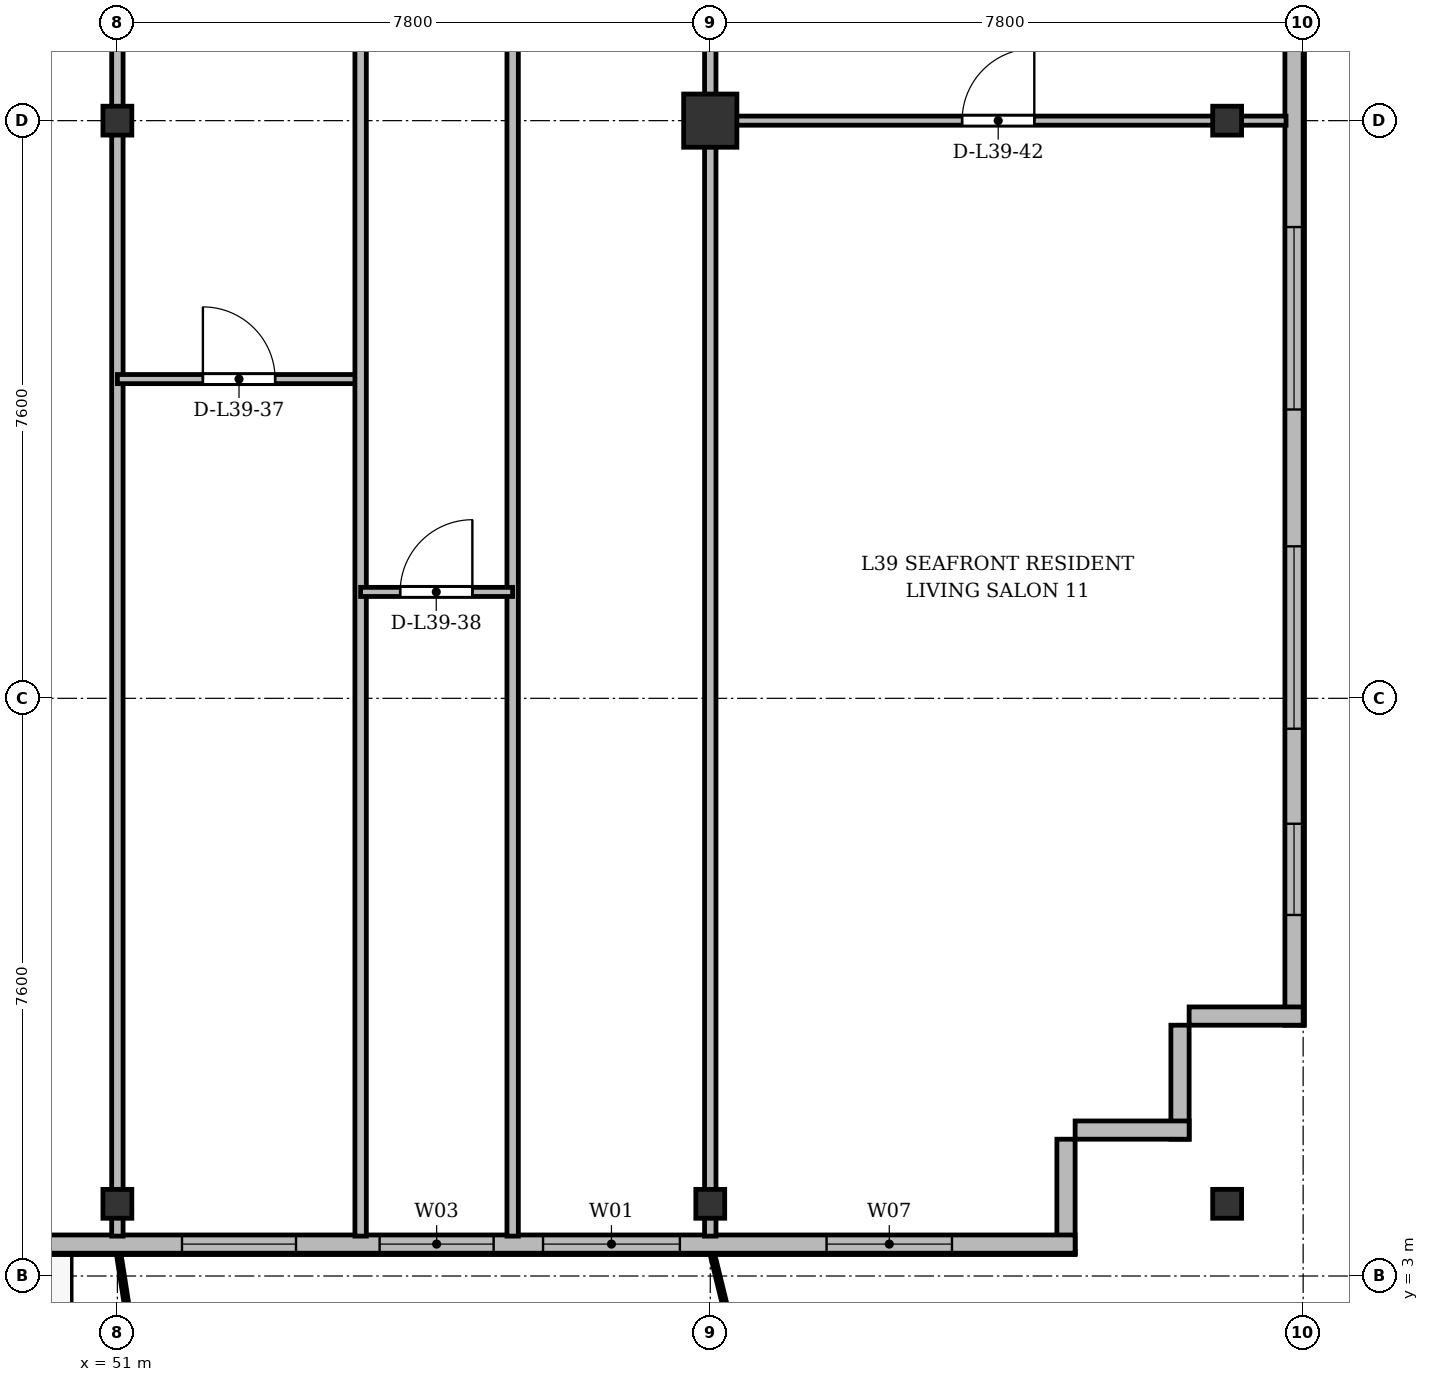
"""IFC4 building model, lengths in metres.
Left out: names, types, materials, properties, quantities, classifications, styles, units other than length and angle.
Written with IfcOpenShell. Run it as: python <this file> out.ifc"""

import sys

from ifc_helpers import new_model, si_unit, direction, frame, frame_2d, origin, origin_2d, place, context, subcontext, project, spatial, rectangle, i_section, extrude, source, transform, mapped, element, fill, save


model = new_model("IFC4")
c1 = context("Model", 3, precision=1e-05, world=origin(), true_north=direction((0.0, 1.0)))
c2 = subcontext(c1, "Body", "Model", "MODEL_VIEW")
j1 = project(units=[si_unit("LENGTHUNIT", "METRE"), si_unit("PLANEANGLEUNIT", "RADIAN")], contexts=[c1])
p1 = place(None, origin())
s1 = spatial("IfcSite", under=j1, at=p1, CompositionType="ELEMENT")
p2 = place(p1, origin())
s2 = spatial("IfcBuilding", under=s1, at=p2, CompositionType="ELEMENT")
p3 = place(p2, frame((0.0, 0.0, 150.1)))
s3 = spatial("IfcBuildingStorey", under=s2, at=p3, CompositionType="ELEMENT", Elevation=150.1)
m1 = source(origin(), c2, "Body", "SweptSolid", [
    extrude(i_section(OverallWidth=0.38, OverallDepth=0.38, WebThickness=0.02, FlangeThickness=0.03, at=origin_2d()), origin(), (0.0, 0.0, 1.0), 3.6),
])
for number, where, z_axis, x_axis in (
    (1, (51.0, 3.95, 0.0), (0.0, 0.0, 1.0), (1.0, 0.0, 0.0)),
    (2, (51.0, 18.2, 0.0), (0.0, 0.0, 1.0), (1.0, 0.0, 0.0)),
    (3, (58.8, 3.95, 0.0), (0.0, 0.0, 1.0), (1.0, 0.0, 0.0)),
):
    element("IfcColumn", number, at=place(p3, frame(where, z_axis=z_axis, x_axis=x_axis)), inside=s3, PredefinedType="COLUMN", context=c2, shape_type="MappedRepresentation", body=[
        mapped(m1, transform((0.0, 0.0, 0.0), x_axis=(1.0, 0.0, 0.0), y_axis=(0.0, 1.0, 0.0), z_axis=(0.0, 0.0, 1.0), scale=1.0)),
    ])
m2 = source(origin(), c2, "Body", "SweptSolid", [
    extrude(rectangle(XDim=0.7, YDim=0.7, at=origin_2d()), origin(), (0.0, 0.0, 1.0), 3.6),
])
p4 = place(p3, frame((58.8, 18.2, 0.0), z_axis=(0.0, 0.0, 1.0), x_axis=(1.0, 0.0, 0.0)))
e4 = element("IfcColumn", 4, at=p4, inside=s3, PredefinedType="COLUMN", context=c2, shape_type="MappedRepresentation", body=[
    mapped(m2, transform((0.0, 0.0, 0.0), x_axis=(1.0, 0.0, 0.0), y_axis=(0.0, 1.0, 0.0), z_axis=(0.0, 0.0, 1.0), scale=1.0)),
])
for number, where, z_axis, x_axis in (
    (5, (65.6, 3.95, 0.0), (0.0, 0.0, 1.0), (1.0, 0.0, 0.0)),
    (6, (65.6, 18.2, 0.0), (0.0, 0.0, 1.0), (1.0, 0.0, 0.0)),
):
    element("IfcColumn", number, at=place(p3, frame(where, z_axis=z_axis, x_axis=x_axis)), inside=s3, PredefinedType="COLUMN", context=c2, shape_type="MappedRepresentation", body=[
        mapped(m1, transform((0.0, 0.0, 0.0), x_axis=(1.0, 0.0, 0.0), y_axis=(0.0, 1.0, 0.0), z_axis=(0.0, 0.0, 1.0), scale=1.0)),
    ])
p5 = place(p3, frame((66.48, 45.5, 0.0), z_axis=(0.0, 0.0, 1.0), x_axis=(0.0, -1.0, 0.0)))
e7 = element("IfcWall", 7, at=p5, inside=s3, PredefinedType="SOLIDWALL", context=c2, shape_type="SweptSolid", body=[
    extrude(rectangle(XDim=39.2, YDim=0.24, at=frame_2d((19.6, 0.0))), origin(), (0.0, 0.0, 1.0), 3.35),
])
p6 = place(p5, frame((36.55, 0.0, 0.92)))
e8 = element("IfcOpeningElement", 8, at=p6, cuts=e7, PredefinedType="OPENING", context=c2, shape_type="SweptSolid", body=[
    extrude(rectangle(XDim=1.2, YDim=1.65, at=frame_2d((0.6, 0.825))), frame((0.0, 0.13, 0.0), z_axis=(0.0, -1.0, 0.0), x_axis=(1.0, 0.0, 0.0)), (0.0, 0.0, 1.0), 0.26),
])
p7 = place(p5, frame((32.9, 0.0, 0.92)))
e9 = element("IfcOpeningElement", 9, at=p7, cuts=e7, PredefinedType="OPENING", context=c2, shape_type="SweptSolid", body=[
    extrude(rectangle(XDim=2.4, YDim=2.1, at=frame_2d((1.2, 1.05))), frame((0.0, 0.13, 0.0), z_axis=(0.0, -1.0, 0.0), x_axis=(1.0, 0.0, 0.0)), (0.0, 0.0, 1.0), 0.26),
])
p8 = place(p5, frame((28.7, 0.0, 0.92)))
e10 = element("IfcOpeningElement", 10, at=p8, cuts=e7, PredefinedType="OPENING", context=c2, shape_type="SweptSolid", body=[
    extrude(rectangle(XDim=2.4, YDim=2.1, at=frame_2d((1.2, 1.05))), frame((0.0, 0.13, 0.0), z_axis=(0.0, -1.0, 0.0), x_axis=(1.0, 0.0, 0.0)), (0.0, 0.0, 1.0), 0.26),
])
p9 = place(p5, frame((21.5, 0.0, 0.92)))
e11 = element("IfcOpeningElement", 11, at=p9, cuts=e7, PredefinedType="OPENING", context=c2, shape_type="SweptSolid", body=[
    extrude(rectangle(XDim=2.4, YDim=2.1, at=frame_2d((1.2, 1.05))), frame((0.0, 0.13, 0.0), z_axis=(0.0, -1.0, 0.0), x_axis=(1.0, 0.0, 0.0)), (0.0, 0.0, 1.0), 0.26),
])
p10 = place(p5, frame((7.5, 0.0, 0.92)))
e12 = element("IfcOpeningElement", 12, at=p10, cuts=e7, PredefinedType="OPENING", context=c2, shape_type="SweptSolid", body=[
    extrude(rectangle(XDim=2.4, YDim=2.1, at=frame_2d((1.2, 1.05))), frame((0.0, 0.13, 0.0), z_axis=(0.0, -1.0, 0.0), x_axis=(1.0, 0.0, 0.0)), (0.0, 0.0, 1.0), 0.26),
])
p11 = place(p5, frame((4.5, 0.0, 0.92)))
e13 = element("IfcOpeningElement", 13, at=p11, cuts=e7, PredefinedType="OPENING", context=c2, shape_type="SweptSolid", body=[
    extrude(rectangle(XDim=1.2, YDim=1.65, at=frame_2d((0.6, 0.825))), frame((0.0, 0.13, 0.0), z_axis=(0.0, -1.0, 0.0), x_axis=(1.0, 0.0, 0.0)), (0.0, 0.0, 1.0), 0.26),
])
p12 = place(p5, frame((1.15, 0.0, 0.92)))
e14 = element("IfcOpeningElement", 14, at=p12, cuts=e7, PredefinedType="OPENING", context=c2, shape_type="SweptSolid", body=[
    extrude(rectangle(XDim=1.2, YDim=1.65, at=frame_2d((0.6, 0.825))), frame((0.0, 0.13, 0.0), z_axis=(0.0, -1.0, 0.0), x_axis=(1.0, 0.0, 0.0)), (0.0, 0.0, 1.0), 0.26),
])
p13 = place(p3, frame((66.6, 6.42, 0.0), z_axis=(0.0, 0.0, 1.0), x_axis=(-1.0, 0.0, 0.0)))
e15 = element("IfcWall", 15, at=p13, inside=s3, PredefinedType="SOLIDWALL", context=c2, shape_type="SweptSolid", body=[
    extrude(rectangle(XDim=1.5, YDim=0.24, at=frame_2d((0.75, 0.0))), origin(), (0.0, 0.0, 1.0), 2.85),
])
for number, where, z_axis, x_axis in (
    (16, (64.98, 6.3, 0.0), (0.0, 0.0, 1.0), (0.0, -1.0, 0.0)),
    (17, (65.1, 4.92, 0.0), (0.0, 0.0, 1.0), (-1.0, 0.0, 0.0)),
):
    element("IfcWall", number, at=place(p3, frame(where, z_axis=z_axis, x_axis=x_axis)), inside=s3, PredefinedType="SOLIDWALL", context=c2, shape_type="SweptSolid", body=[
        extrude(rectangle(XDim=1.5, YDim=0.24, at=frame_2d((0.75, 0.0))), origin(), (0.0, 0.0, 1.0), 3.35),
    ])
p14 = place(p3, frame((63.48, 4.8, 0.0), z_axis=(0.0, 0.0, 1.0), x_axis=(0.0, -1.0, 0.0)))
e18 = element("IfcWall", 18, at=p14, inside=s3, PredefinedType="SOLIDWALL", context=c2, shape_type="SweptSolid", body=[
    extrude(rectangle(XDim=1.5, YDim=0.24, at=frame_2d((0.75, 0.0))), origin(), (0.0, 0.0, 1.0), 2.75),
])
p15 = place(p3, frame((63.6, 3.42, 0.0), z_axis=(0.0, 0.0, 1.0), x_axis=(-1.0, 0.0, 0.0)))
e19 = element("IfcWall", 19, at=p15, inside=s3, PredefinedType="SOLIDWALL", context=c2, shape_type="SweptSolid", body=[
    extrude(rectangle(XDim=52.8, YDim=0.24, at=frame_2d((26.4, 0.0))), origin(), (0.0, 0.0, 1.0), 3.35),
])
p16 = place(p15, frame((1.62, 0.0, 0.9)))
e20 = element("IfcOpeningElement", 20, at=p16, cuts=e19, PredefinedType="OPENING", context=c2, shape_type="SweptSolid", body=[
    extrude(rectangle(XDim=1.65, YDim=1.85, at=frame_2d((0.825, 0.925))), frame((0.0, 0.13, 0.0), z_axis=(0.0, -1.0, 0.0), x_axis=(1.0, 0.0, 0.0)), (0.0, 0.0, 1.0), 0.26),
])
p17 = place(p15, frame((5.2, 0.0, 0.9)))
e21 = element("IfcOpeningElement", 21, at=p17, cuts=e19, PredefinedType="OPENING", context=c2, shape_type="SweptSolid", body=[
    extrude(rectangle(XDim=1.8, YDim=1.8, at=frame_2d((0.9, 0.9))), frame((0.0, 0.13, 0.0), z_axis=(0.0, -1.0, 0.0), x_axis=(1.0, 0.0, 0.0)), (0.0, 0.0, 1.0), 0.26),
])
p18 = place(p15, frame((7.65, 0.0, 0.9)))
e22 = element("IfcOpeningElement", 22, at=p18, cuts=e19, PredefinedType="OPENING", context=c2, shape_type="SweptSolid", body=[
    extrude(rectangle(XDim=1.5, YDim=1.75, at=frame_2d((0.75, 0.875))), frame((0.0, 0.13, 0.0), z_axis=(0.0, -1.0, 0.0), x_axis=(1.0, 0.0, 0.0)), (0.0, 0.0, 1.0), 0.26),
])
p19 = place(p15, frame((10.25, 0.0, 0.9)))
e23 = element("IfcOpeningElement", 23, at=p19, cuts=e19, PredefinedType="OPENING", context=c2, shape_type="SweptSolid", body=[
    extrude(rectangle(XDim=1.5, YDim=1.75, at=frame_2d((0.75, 0.875))), frame((0.0, 0.13, 0.0), z_axis=(0.0, -1.0, 0.0), x_axis=(1.0, 0.0, 0.0)), (0.0, 0.0, 1.0), 0.26),
])
p20 = place(p15, frame((14.417, 0.0, 0.0)))
e24 = element("IfcOpeningElement", 24, at=p20, cuts=e19, PredefinedType="OPENING", context=c2, shape_type="SweptSolid", body=[
    extrude(rectangle(XDim=1.2, YDim=2.2, at=frame_2d((0.6, 1.1))), frame((0.0, 0.13, 0.0), z_axis=(0.0, -1.0, 0.0), x_axis=(1.0, 0.0, 0.0)), (0.0, 0.0, 1.0), 0.26),
])
p21 = place(p15, frame((25.575, 0.0, 0.9)))
e25 = element("IfcOpeningElement", 25, at=p21, cuts=e19, PredefinedType="OPENING", context=c2, shape_type="SweptSolid", body=[
    extrude(rectangle(XDim=1.65, YDim=1.85, at=frame_2d((0.825, 0.925))), frame((0.0, 0.13, 0.0), z_axis=(0.0, -1.0, 0.0), x_axis=(1.0, 0.0, 0.0)), (0.0, 0.0, 1.0), 0.26),
])
p22 = place(p15, frame((35.7, 0.0, 0.9)))
e26 = element("IfcOpeningElement", 26, at=p22, cuts=e19, PredefinedType="OPENING", context=c2, shape_type="SweptSolid", body=[
    extrude(rectangle(XDim=1.8, YDim=1.8, at=frame_2d((0.9, 0.9))), frame((0.0, 0.13, 0.0), z_axis=(0.0, -1.0, 0.0), x_axis=(1.0, 0.0, 0.0)), (0.0, 0.0, 1.0), 0.26),
])
p23 = place(p15, frame((41.656, 0.0, 0.0)))
e27 = element("IfcOpeningElement", 27, at=p23, cuts=e19, PredefinedType="OPENING", context=c2, shape_type="SweptSolid", body=[
    extrude(rectangle(XDim=1.2, YDim=2.2, at=frame_2d((0.6, 1.1))), frame((0.0, 0.13, 0.0), z_axis=(0.0, -1.0, 0.0), x_axis=(1.0, 0.0, 0.0)), (0.0, 0.0, 1.0), 0.26),
])
p24 = place(p15, frame((43.65, 0.0, 0.9)))
e28 = element("IfcOpeningElement", 28, at=p24, cuts=e19, PredefinedType="OPENING", context=c2, shape_type="SweptSolid", body=[
    extrude(rectangle(XDim=1.5, YDim=1.75, at=frame_2d((0.75, 0.875))), frame((0.0, 0.13, 0.0), z_axis=(0.0, -1.0, 0.0), x_axis=(1.0, 0.0, 0.0)), (0.0, 0.0, 1.0), 0.26),
])
p25 = place(p15, frame((45.7, 0.0, 0.9)))
e29 = element("IfcOpeningElement", 29, at=p25, cuts=e19, PredefinedType="OPENING", context=c2, shape_type="SweptSolid", body=[
    extrude(rectangle(XDim=2.0, YDim=1.95, at=frame_2d((1.0, 0.975))), frame((0.0, 0.13, 0.0), z_axis=(0.0, -1.0, 0.0), x_axis=(1.0, 0.0, 0.0)), (0.0, 0.0, 1.0), 0.26),
])
p26 = place(p15, frame((49.53, 0.0, 0.9)))
e30 = element("IfcOpeningElement", 30, at=p26, cuts=e19, PredefinedType="OPENING", context=c2, shape_type="SweptSolid", body=[
    extrude(rectangle(XDim=1.65, YDim=1.85, at=frame_2d((0.825, 0.925))), frame((0.0, 0.13, 0.0), z_axis=(0.0, -1.0, 0.0), x_axis=(1.0, 0.0, 0.0)), (0.0, 0.0, 1.0), 0.26),
])
for number, where, z_axis, x_axis in (
    (31, (51.0, 3.525, 0.0), (0.0, 0.0, 1.0), (0.0, 1.0, 0.0)),
    (32, (58.8, 3.525, 0.0), (0.0, 0.0, 1.0), (0.0, 1.0, 0.0)),
):
    element("IfcWall", number, at=place(p3, frame(where, z_axis=z_axis, x_axis=x_axis)), inside=s3, PredefinedType="PARTITIONING", context=c2, shape_type="SweptSolid", body=[
        extrude(rectangle(XDim=27.275, YDim=0.15, at=frame_2d((13.638, 0.0))), origin(), (0.0, 0.0, 1.0), 2.85),
    ])
p27 = place(p3, frame((51.0, 14.8, 0.0), z_axis=(0.0, 0.0, 1.0), x_axis=(1.0, 0.0, 0.0)))
e33 = element("IfcWall", 33, at=p27, inside=s3, PredefinedType="PARTITIONING", context=c2, shape_type="SweptSolid", body=[
    extrude(rectangle(XDim=3.2, YDim=0.12, at=frame_2d((1.6, 0.0))), origin(), (0.0, 0.0, 1.0), 2.85),
])
p28 = place(p27, frame((1.125, 0.0, 0.0)))
e34 = element("IfcOpeningElement", 34, at=p28, cuts=e33, PredefinedType="OPENING", context=c2, shape_type="SweptSolid", body=[
    extrude(rectangle(XDim=0.95, YDim=2.15, at=frame_2d((0.475, 1.075))), frame((0.0, 0.07, 0.0), z_axis=(0.0, -1.0, 0.0), x_axis=(1.0, 0.0, 0.0)), (0.0, 0.0, 1.0), 0.14),
])
for number, where, z_axis, x_axis in (
    (35, (54.2, 3.525, 0.0), (0.0, 0.0, 1.0), (0.0, 1.0, 0.0)),
    (36, (56.2, 3.525, 0.0), (0.0, 0.0, 1.0), (0.0, 1.0, 0.0)),
):
    element("IfcWall", number, at=place(p3, frame(where, z_axis=z_axis, x_axis=x_axis)), inside=s3, PredefinedType="PARTITIONING", context=c2, shape_type="SweptSolid", body=[
        extrude(rectangle(XDim=27.275, YDim=0.15, at=frame_2d((13.638, 0.0))), origin(), (0.0, 0.0, 1.0), 2.75),
    ])
p29 = place(p3, frame((54.2, 12.0, 0.0), z_axis=(0.0, 0.0, 1.0), x_axis=(1.0, 0.0, 0.0)))
e37 = element("IfcWall", 37, at=p29, inside=s3, PredefinedType="PARTITIONING", context=c2, shape_type="SweptSolid", body=[
    extrude(rectangle(XDim=2.0, YDim=0.12, at=frame_2d((1.0, 0.0))), origin(), (0.0, 0.0, 1.0), 3.35),
])
p30 = place(p29, frame((0.52, 0.0, 0.0)))
e38 = element("IfcOpeningElement", 38, at=p30, cuts=e37, PredefinedType="OPENING", context=c2, shape_type="SweptSolid", body=[
    extrude(rectangle(XDim=0.95, YDim=2.15, at=frame_2d((0.475, 1.075))), frame((0.0, 0.07, 0.0), z_axis=(0.0, -1.0, 0.0), x_axis=(1.0, 0.0, 0.0)), (0.0, 0.0, 1.0), 0.14),
])
p31 = place(p3, frame((58.8, 18.2, 0.0), z_axis=(0.0, 0.0, 1.0), x_axis=(1.0, 0.0, 0.0)))
e39 = element("IfcWall", 39, at=p31, inside=s3, PredefinedType="PARTITIONING", context=c2, shape_type="SweptSolid", body=[
    extrude(rectangle(XDim=7.575, YDim=0.12, at=frame_2d((3.788, 0.0))), origin(), (0.0, 0.0, 1.0), 2.75),
])
p32 = place(p31, frame((3.313, 0.0, 0.0)))
e40 = element("IfcOpeningElement", 40, at=p32, cuts=e39, PredefinedType="OPENING", context=c2, shape_type="SweptSolid", body=[
    extrude(rectangle(XDim=0.95, YDim=2.15, at=frame_2d((0.475, 1.075))), frame((0.0, 0.07, 0.0), z_axis=(0.0, -1.0, 0.0), x_axis=(1.0, 0.0, 0.0)), (0.0, 0.0, 1.0), 0.14),
])
m3 = source(origin(), c2, "Body", "SweptSolid", [
    extrude(rectangle(XDim=1.2, YDim=1.65, at=frame_2d((0.6, 0.825))), frame((0.0, 0.03, 0.0), z_axis=(0.0, -1.0, 0.0), x_axis=(1.0, 0.0, 0.0)), (0.0, 0.0, 1.0), 0.06),
])
p33 = place(p6, origin())
e41 = element("IfcWindow", 41, at=p33, inside=s3, PartitioningType="SINGLE_PANEL", PredefinedType="WINDOW", context=c2, shape_type="MappedRepresentation", body=[
    mapped(m3, transform((0.0, 0.0, 0.0), x_axis=(1.0, 0.0, 0.0), y_axis=(0.0, 1.0, 0.0), z_axis=(0.0, 0.0, 1.0), scale=1.0)),
])
fill(e8, e41)
m4 = source(origin(), c2, "Body", "SweptSolid", [
    extrude(rectangle(XDim=2.4, YDim=2.1, at=frame_2d((1.2, 1.05))), frame((0.0, 0.03, 0.0), z_axis=(0.0, -1.0, 0.0), x_axis=(1.0, 0.0, 0.0)), (0.0, 0.0, 1.0), 0.06),
])
p34 = place(p7, origin())
e42 = element("IfcWindow", 42, at=p34, inside=s3, PartitioningType="SINGLE_PANEL", PredefinedType="WINDOW", context=c2, shape_type="MappedRepresentation", body=[
    mapped(m4, transform((0.0, 0.0, 0.0), x_axis=(1.0, 0.0, 0.0), y_axis=(0.0, 1.0, 0.0), z_axis=(0.0, 0.0, 1.0), scale=1.0)),
])
fill(e9, e42)
p35 = place(p8, origin())
e43 = element("IfcWindow", 43, at=p35, inside=s3, PartitioningType="SINGLE_PANEL", PredefinedType="WINDOW", context=c2, shape_type="MappedRepresentation", body=[
    mapped(m4, transform((0.0, 0.0, 0.0), x_axis=(1.0, 0.0, 0.0), y_axis=(0.0, 1.0, 0.0), z_axis=(0.0, 0.0, 1.0), scale=1.0)),
])
fill(e10, e43)
m5 = source(origin(), c2, "Body", "SweptSolid", [
    extrude(rectangle(XDim=1.65, YDim=1.85, at=frame_2d((0.825, 0.925))), frame((0.0, 0.03, 0.0), z_axis=(0.0, -1.0, 0.0), x_axis=(1.0, 0.0, 0.0)), (0.0, 0.0, 1.0), 0.06),
])
p36 = place(p16, origin())
e44 = element("IfcWindow", 44, at=p36, inside=s3, PartitioningType="SINGLE_PANEL", PredefinedType="WINDOW", context=c2, shape_type="MappedRepresentation", body=[
    mapped(m5, transform((0.0, 0.0, 0.0), x_axis=(1.0, 0.0, 0.0), y_axis=(0.0, 1.0, 0.0), z_axis=(0.0, 0.0, 1.0), scale=1.0)),
])
fill(e20, e44)
m6 = source(origin(), c2, "Body", "SweptSolid", [
    extrude(rectangle(XDim=1.8, YDim=1.8, at=frame_2d((0.9, 0.9))), frame((0.0, 0.03, 0.0), z_axis=(0.0, -1.0, 0.0), x_axis=(1.0, 0.0, 0.0)), (0.0, 0.0, 1.0), 0.06),
])
p37 = place(p17, origin())
e45 = element("IfcWindow", 45, at=p37, inside=s3, PartitioningType="SINGLE_PANEL", PredefinedType="WINDOW", context=c2, shape_type="MappedRepresentation", body=[
    mapped(m6, transform((0.0, 0.0, 0.0), x_axis=(1.0, 0.0, 0.0), y_axis=(0.0, 1.0, 0.0), z_axis=(0.0, 0.0, 1.0), scale=1.0)),
])
fill(e21, e45)
m7 = source(origin(), c2, "Body", "SweptSolid", [
    extrude(rectangle(XDim=1.5, YDim=1.75, at=frame_2d((0.75, 0.875))), frame((0.0, 0.03, 0.0), z_axis=(0.0, -1.0, 0.0), x_axis=(1.0, 0.0, 0.0)), (0.0, 0.0, 1.0), 0.06),
])
p38 = place(p18, origin())
e46 = element("IfcWindow", 46, at=p38, inside=s3, PartitioningType="SINGLE_PANEL", PredefinedType="WINDOW", context=c2, shape_type="MappedRepresentation", body=[
    mapped(m7, transform((0.0, 0.0, 0.0), x_axis=(1.0, 0.0, 0.0), y_axis=(0.0, 1.0, 0.0), z_axis=(0.0, 0.0, 1.0), scale=1.0)),
])
fill(e22, e46)
p39 = place(p19, origin())
e47 = element("IfcWindow", 47, at=p39, inside=s3, PartitioningType="SINGLE_PANEL", PredefinedType="WINDOW", context=c2, shape_type="MappedRepresentation", body=[
    mapped(m7, transform((0.0, 0.0, 0.0), x_axis=(1.0, 0.0, 0.0), y_axis=(0.0, 1.0, 0.0), z_axis=(0.0, 0.0, 1.0), scale=1.0)),
])
fill(e23, e47)
m8 = source(origin(), c2, "Body", "SweptSolid", [
    extrude(rectangle(XDim=0.95, YDim=2.15, at=frame_2d((0.475, 1.075))), frame((0.0, 0.025, 0.0), z_axis=(0.0, -1.0, 0.0), x_axis=(1.0, 0.0, 0.0)), (0.0, 0.0, 1.0), 0.05),
])
p40 = place(p28, origin())
e48 = element("IfcDoor", 48, at=p40, inside=s3, OperationType="SINGLE_SWING_LEFT", PredefinedType="DOOR", context=c2, shape_type="MappedRepresentation", body=[
    mapped(m8, transform((0.0, 0.0, 0.0), x_axis=(1.0, 0.0, 0.0), y_axis=(0.0, 1.0, 0.0), z_axis=(0.0, 0.0, 1.0), scale=1.0)),
])
fill(e34, e48)
p41 = place(p30, origin())
e49 = element("IfcDoor", 49, at=p41, inside=s3, OperationType="SINGLE_SWING_RIGHT", PredefinedType="DOOR", context=c2, shape_type="MappedRepresentation", body=[
    mapped(m8, transform((0.0, 0.0, 0.0), x_axis=(1.0, 0.0, 0.0), y_axis=(0.0, 1.0, 0.0), z_axis=(0.0, 0.0, 1.0), scale=1.0)),
])
fill(e38, e49)
p42 = place(p32, origin())
e50 = element("IfcDoor", 50, at=p42, inside=s3, OperationType="SINGLE_SWING_RIGHT", PredefinedType="DOOR", context=c2, shape_type="MappedRepresentation", body=[
    mapped(m8, transform((0.0, 0.0, 0.0), x_axis=(1.0, 0.0, 0.0), y_axis=(0.0, 1.0, 0.0), z_axis=(0.0, 0.0, 1.0), scale=1.0)),
])
fill(e40, e50)
save(model, sys.argv[1])
